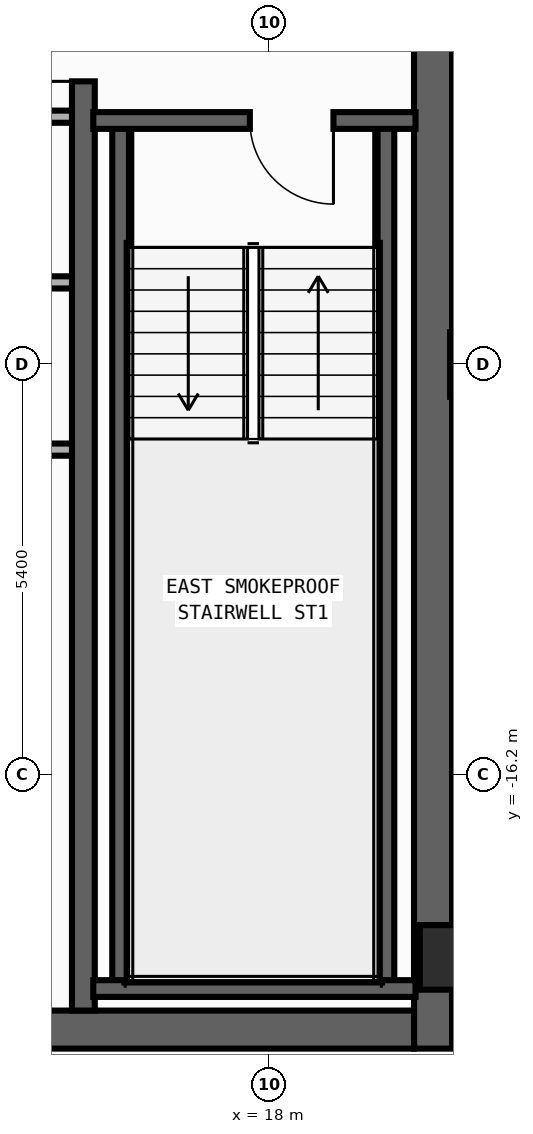
"""IFC4 building model, lengths in metres.
Left out: names, types, materials, properties, quantities, classifications, styles, units other than length and angle.
Written with IfcOpenShell. Run it as: python <this file> out.ifc"""

import sys

from ifc_helpers import new_model, si_unit, direction, frame, frame_2d, origin, origin_2d, place, context, subcontext, project, spatial, rectangle, extrude, element, fill, save


model = new_model("IFC4")
c1 = context("Model", 3, precision=1e-05, world=origin(), true_north=direction((0.0, 1.0)))
c2 = subcontext(c1, "Body", "Model", "MODEL_VIEW")
j1 = project(units=[si_unit("LENGTHUNIT", "METRE"), si_unit("PLANEANGLEUNIT", "RADIAN")], contexts=[c1])
p1 = place(None, origin())
s1 = spatial("IfcSite", under=j1, at=p1, CompositionType="ELEMENT")
p2 = place(p1, origin())
s2 = spatial("IfcBuilding", under=s1, at=p2, CompositionType="ELEMENT")
p3 = place(p2, frame((0.0, 0.0, 247.6)))
s3 = spatial("IfcBuildingStorey", under=s2, at=p3, CompositionType="ELEMENT", Elevation=247.6)
p4 = place(p3, frame((20.15, -19.8, 0.0), z_axis=(0.0, 0.0, 1.0), x_axis=(0.0, 1.0, 0.0)))
e1 = element("IfcWall", 1, at=p4, inside=s3, PredefinedType="SHEAR", context=c2, shape_type="SweptSolid", body=[
    extrude(rectangle(XDim=27.0, YDim=0.5, at=frame_2d((13.5, 0.0))), origin(), (0.0, 0.0, 1.0), 3.34),
])
p5 = place(p3, frame((12.5, -19.55, 0.0), z_axis=(0.0, 0.0, 1.0), x_axis=(1.0, 0.0, 0.0)))
e2 = element("IfcWall", 2, at=p5, inside=s3, PredefinedType="SHEAR", context=c2, shape_type="SweptSolid", body=[
    extrude(rectangle(XDim=7.4, YDim=0.5, at=frame_2d((3.7, 0.0))), origin(), (0.0, 0.0, 1.0), 3.34),
])
p6 = place(p3, frame((15.55, -19.3, 0.0), z_axis=(0.0, 0.0, 1.0), x_axis=(0.0, 1.0, 0.0)))
e3 = element("IfcWall", 3, at=p6, inside=s3, PredefinedType="SHEAR", context=c2, shape_type="SweptSolid", body=[
    extrude(rectangle(XDim=26.0, YDim=0.3, at=frame_2d((13.0, 0.0))), origin(), (0.0, 0.0, 1.0), 3.34),
])
p7 = place(p6, frame((12.225, 0.0, 0.0)))
e4 = element("IfcOpeningElement", 4, at=p7, cuts=e3, PredefinedType="OPENING", context=c2, shape_type="SweptSolid", body=[
    extrude(rectangle(XDim=1.15, YDim=2.2, at=frame_2d((0.575, 1.1))), frame((0.0, 0.16, 0.0), z_axis=(0.0, -1.0, 0.0), x_axis=(1.0, 0.0, 0.0)), (0.0, 0.0, 1.0), 0.32),
])
p8 = place(p6, frame((24.625, 0.0, 0.0)))
e5 = element("IfcOpeningElement", 5, at=p8, cuts=e3, PredefinedType="OPENING", context=c2, shape_type="SweptSolid", body=[
    extrude(rectangle(XDim=0.85, YDim=2.1, at=frame_2d((0.425, 1.05))), frame((0.0, 0.16, 0.0), z_axis=(0.0, -1.0, 0.0), x_axis=(1.0, 0.0, 0.0)), (0.0, 0.0, 1.0), 0.32),
])
for number, where, z_axis, x_axis in (
    (6, (16.04, -19.01, 0.0), (0.0, 0.0, 1.0), (0.0, 1.0, 0.0)),
    (7, (19.53, -19.01, 0.0), (0.0, 0.0, 1.0), (0.0, 1.0, 0.0)),
):
    element("IfcWall", number, at=place(p3, frame(where, z_axis=z_axis, x_axis=x_axis)), inside=s3, PredefinedType="SHEAR", context=c2, shape_type="SweptSolid", body=[
        extrude(rectangle(XDim=11.42, YDim=0.22, at=frame_2d((5.71, 0.0))), origin(), (0.0, 0.0, 1.0), 3.34),
    ])
p9 = place(p3, frame((15.68, -19.01, 0.0), z_axis=(0.0, 0.0, 1.0), x_axis=(1.0, 0.0, 0.0)))
e8 = element("IfcWall", 8, at=p9, inside=s3, PredefinedType="SHEAR", context=c2, shape_type="SweptSolid", body=[
    extrude(rectangle(XDim=4.24, YDim=0.22, at=frame_2d((2.12, 0.0))), origin(), (0.0, 0.0, 1.0), 3.34),
])
p10 = place(p3, frame((19.92, -7.59, 0.0), z_axis=(0.0, 0.0, 1.0), x_axis=(-1.0, 0.0, 0.0)))
e9 = element("IfcWall", 9, at=p10, inside=s3, PredefinedType="SHEAR", context=c2, shape_type="SweptSolid", body=[
    extrude(rectangle(XDim=4.24, YDim=0.22, at=frame_2d((2.12, 0.0))), origin(), (0.0, 0.0, 1.0), 3.34),
])
p11 = place(p10, frame((1.08, 0.0, 0.0)))
e10 = element("IfcOpeningElement", 10, at=p11, cuts=e9, PredefinedType="OPENING", context=c2, shape_type="SweptSolid", body=[
    extrude(rectangle(XDim=1.1, YDim=2.2, at=frame_2d((0.55, 1.1))), frame((0.0, 0.12, 0.0), z_axis=(0.0, -1.0, 0.0), x_axis=(1.0, 0.0, 0.0)), (0.0, 0.0, 1.0), 0.24),
])
for number, where, z_axis, x_axis in (
    (11, (20.4, -18.6, 0.0), (0.0, 0.0, 1.0), (1.0, 0.0, 0.0)),
    (12, (20.8, -10.8, 0.0), (0.0, 0.0, 1.0), (1.0, 0.0, 0.0)),
):
    element("IfcColumn", number, at=place(p3, frame(where, z_axis=z_axis, x_axis=x_axis)), inside=s3, PredefinedType="COLUMN", context=c2, shape_type="SweptSolid", body=[
        extrude(rectangle(XDim=0.85, YDim=0.85, at=origin_2d()), origin(), (0.0, 0.0, 1.0), 3.6),
    ])
p12 = place(p3, frame((12.8, -7.54, 0.0), z_axis=(0.0, 0.0, 1.0), x_axis=(1.0, 0.0, 0.0)))
e13 = element("IfcWall", 13, at=p12, inside=s3, PredefinedType="STANDARD", context=c2, shape_type="SweptSolid", body=[
    extrude(rectangle(XDim=2.6, YDim=0.16, at=frame_2d((1.3, 0.0))), origin(), (0.0, 0.0, 1.0), 3.34),
])
for number, where, z_axis, x_axis in (
    (14, (12.5, -11.92, 0.0), (0.0, 0.0, 1.0), (1.0, 0.0, 0.0)),
    (15, (12.5, -9.72, 0.0), (0.0, 0.0, 1.0), (1.0, 0.0, 0.0)),
):
    element("IfcWall", number, at=place(p3, frame(where, z_axis=z_axis, x_axis=x_axis)), inside=s3, PredefinedType="PARTITIONING", context=c2, shape_type="SweptSolid", body=[
        extrude(rectangle(XDim=2.9, YDim=0.16, at=frame_2d((1.45, 0.0))), origin(), (0.0, 0.0, 1.0), 3.34),
    ])
p13 = place(p11, origin())
e16 = element("IfcDoor", 16, at=p13, inside=s3, OperationType="SINGLE_SWING_LEFT", PredefinedType="DOOR", context=c2, shape_type="SweptSolid", body=[
    extrude(rectangle(XDim=1.1, YDim=2.2, at=frame_2d((0.55, 1.1))), frame((0.0, 0.025, 0.0), z_axis=(0.0, -1.0, 0.0), x_axis=(1.0, 0.0, 0.0)), (0.0, 0.0, 1.0), 0.05),
])
fill(e10, e16)
p14 = place(p7, origin())
e17 = element("IfcDoor", 17, at=p14, inside=s3, OperationType="SINGLE_SWING_LEFT", PredefinedType="DOOR", context=c2, shape_type="SweptSolid", body=[
    extrude(rectangle(XDim=1.15, YDim=2.2, at=frame_2d((0.575, 1.1))), frame((0.0, 0.025, 0.0), z_axis=(0.0, -1.0, 0.0), x_axis=(1.0, 0.0, 0.0)), (0.0, 0.0, 1.0), 0.05),
])
fill(e4, e17)
save(model, sys.argv[1])
